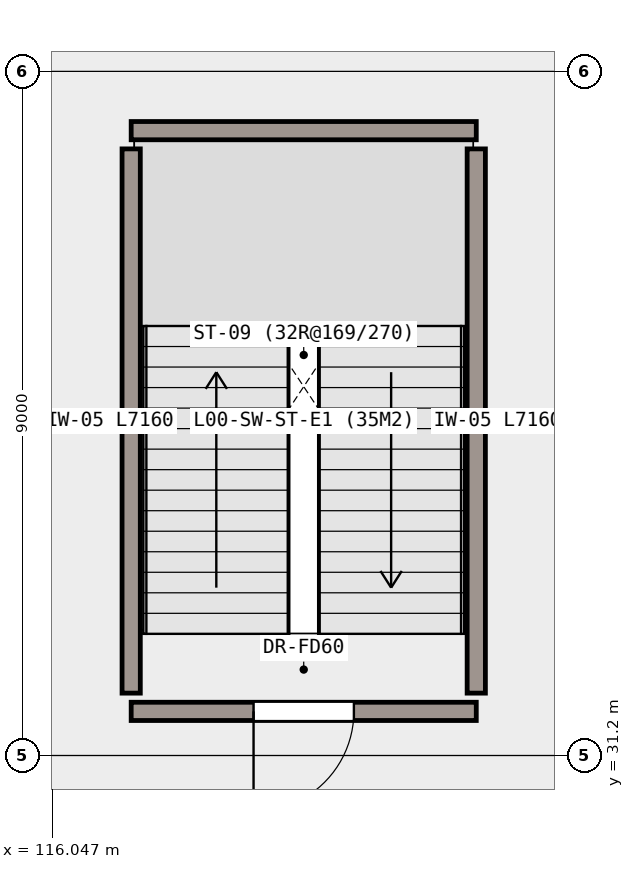
"""IFC4 building model, lengths in metres.
Left out: names, types, materials, properties, quantities, classifications, styles, units other than length and angle.
Written with IfcOpenShell. Run it as: python <this file> out.ifc"""

import sys

from ifc_helpers import new_model, si_unit, direction, frame, frame_2d, origin, place, context, subcontext, project, spatial, rectangle, extrude, element, fill, save


model = new_model("IFC4")
c1 = context("Model", 3, precision=1e-05, world=origin(), true_north=direction((0.0, 1.0)))
c2 = subcontext(c1, "Body", "Model", "MODEL_VIEW")
j1 = project(units=[si_unit("LENGTHUNIT", "METRE"), si_unit("PLANEANGLEUNIT", "RADIAN")], contexts=[c1])
p1 = place(None, origin())
s1 = spatial("IfcSite", under=j1, at=p1, CompositionType="ELEMENT")
p2 = place(p1, origin())
s2 = spatial("IfcBuilding", under=s1, at=p2, CompositionType="ELEMENT")
p3 = place(p2, origin())
s3 = spatial("IfcBuildingStorey", under=s2, at=p3, CompositionType="ELEMENT", Elevation=0.0)
p4 = place(p3, frame((121.62, 31.78, 0.0), z_axis=(0.0, 0.0, 1.0), x_axis=(-1.0, 0.0, 0.0)))
e1 = element("IfcWall", 1, at=p4, inside=s3, PredefinedType="SHEAR", context=c2, shape_type="SweptSolid", body=[
    extrude(rectangle(XDim=4.54, YDim=0.24, at=frame_2d((2.27, 0.0))), origin(), (0.0, 0.0, 1.0), 5.12),
])
p5 = place(p4, frame((1.61, 0.0, 0.0)))
e2 = element("IfcOpeningElement", 2, at=p5, cuts=e1, PredefinedType="OPENING", context=c2, shape_type="SweptSolid", body=[
    extrude(rectangle(XDim=1.32, YDim=2.15, at=frame_2d((0.66, 1.075))), frame((0.0, 0.13, 0.0), z_axis=(0.0, -1.0, 0.0), x_axis=(1.0, 0.0, 0.0)), (0.0, 0.0, 1.0), 0.26),
])
p6 = place(p3, frame((117.08, 39.42, 0.0), z_axis=(0.0, 0.0, 1.0), x_axis=(1.0, 0.0, 0.0)))
e3 = element("IfcWall", 3, at=p6, inside=s3, PredefinedType="SHEAR", context=c2, shape_type="SweptSolid", body=[
    extrude(rectangle(XDim=4.54, YDim=0.24, at=frame_2d((2.27, 0.0))), origin(), (0.0, 0.0, 1.0), 5.12),
])
for number, where, z_axis, x_axis in (
    (4, (117.08, 32.02, 0.0), (0.0, 0.0, 1.0), (0.0, 1.0, 0.0)),
    (5, (121.62, 39.18, 0.0), (0.0, 0.0, 1.0), (0.0, -1.0, 0.0)),
):
    element("IfcWall", number, at=place(p3, frame(where, z_axis=z_axis, x_axis=x_axis)), inside=s3, PredefinedType="SHEAR", context=c2, shape_type="SweptSolid", body=[
        extrude(rectangle(XDim=7.16, YDim=0.24, at=frame_2d((3.58, 0.0))), origin(), (0.0, 0.0, 1.0), 5.12),
    ])
p7 = place(p5, origin())
e6 = element("IfcDoor", 6, at=p7, inside=s3, OperationType="SINGLE_SWING_RIGHT", PredefinedType="DOOR", context=c2, shape_type="SweptSolid", body=[
    extrude(rectangle(XDim=1.32, YDim=2.15, at=frame_2d((0.66, 1.075))), frame((0.0, 0.025, 0.0), z_axis=(0.0, -1.0, 0.0), x_axis=(1.0, 0.0, 0.0)), (0.0, 0.0, 1.0), 0.05),
])
fill(e2, e6)
save(model, sys.argv[1])
